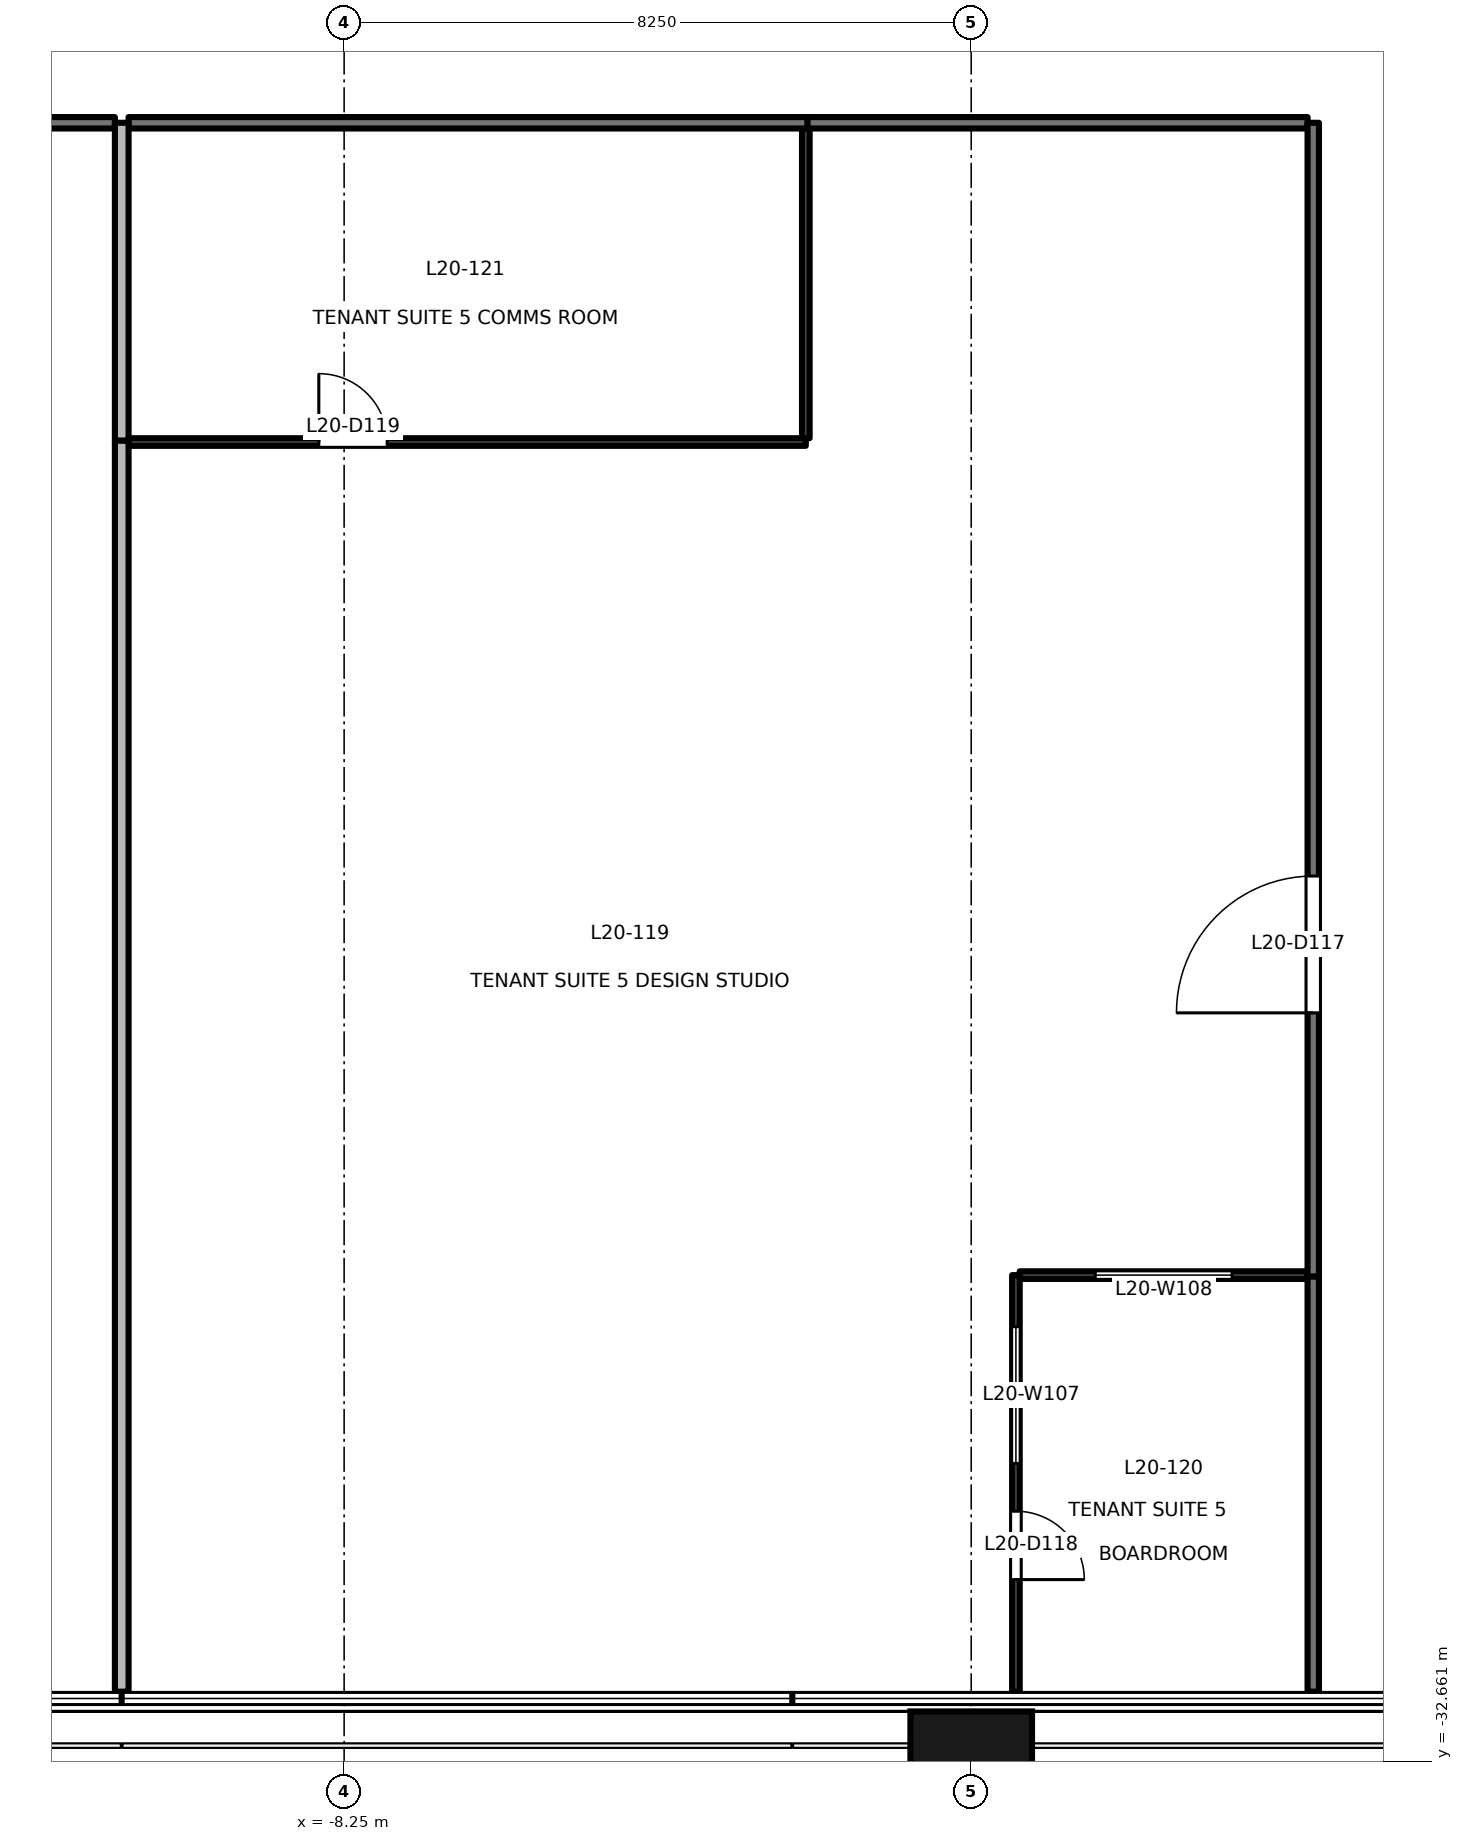
"""IFC4 building model, lengths in metres.
Left out: names, types, materials, properties, quantities, classifications, styles, units other than length and angle.
Written with IfcOpenShell. Run it as: python <this file> out.ifc"""

import sys

from ifc_helpers import new_model, si_unit, direction, frame, frame_2d, origin, origin_2d, place, context, subcontext, project, spatial, rectangle, extrude, element, fill, save


model = new_model("IFC4")
c1 = context("Model", 3, precision=1e-05, world=origin(), true_north=direction((0.0, 1.0)))
c2 = subcontext(c1, "Body", "Model", "MODEL_VIEW")
j1 = project(units=[si_unit("LENGTHUNIT", "METRE"), si_unit("PLANEANGLEUNIT", "RADIAN")], contexts=[c1])
p1 = place(None, origin())
s1 = spatial("IfcSite", under=j1, at=p1, CompositionType="ELEMENT")
p2 = place(p1, origin())
s2 = spatial("IfcBuilding", under=s1, at=p2, CompositionType="ELEMENT")
p3 = place(p2, frame((0.0, 0.0, 91.7)))
s3 = spatial("IfcBuildingStorey", under=s2, at=p3, CompositionType="ELEMENT", Elevation=91.7)
p4 = place(p3, frame((0.0, -32.9, -0.2), z_axis=(0.0, 0.0, 1.0), x_axis=(1.0, 0.0, 0.0)))
e1 = element("IfcColumn", 1, at=p4, inside=s3, PredefinedType="COLUMN", context=c2, shape_type="SweptSolid", body=[
    extrude(rectangle(XDim=1.6, YDim=1.8, at=origin_2d()), origin(), (0.0, 0.0, 1.0), 4.0),
])
p5 = place(p3, frame((-11.266, -11.1, 0.0), z_axis=(0.0, 0.0, 1.0), x_axis=(-1.0, 0.0, 0.0)))
e2 = element("IfcWall", 2, at=p5, inside=s3, PredefinedType="PARTITIONING", context=c2, shape_type="SweptSolid", body=[
    extrude(rectangle(XDim=3.79, YDim=0.15, at=frame_2d((1.895, 0.0))), origin(), (0.0, 0.0, 1.0), 2.8),
])
p6 = place(p5, frame((1.592, 0.0, 0.0)))
e3 = element("IfcOpeningElement", 3, at=p6, cuts=e2, PredefinedType="OPENING", context=c2, shape_type="SweptSolid", body=[
    extrude(rectangle(XDim=1.5, YDim=2.1, at=frame_2d((0.75, 1.05))), frame((0.0, 0.085, 0.0), z_axis=(0.0, -1.0, 0.0), x_axis=(1.0, 0.0, 0.0)), (0.0, 0.0, 1.0), 0.171),
])
p7 = place(p3, frame((4.425, -11.1, 0.0), z_axis=(0.0, 0.0, 1.0), x_axis=(-1.0, 0.0, 0.0)))
e4 = element("IfcWall", 4, at=p7, inside=s3, PredefinedType="PARTITIONING", context=c2, shape_type="SweptSolid", body=[
    extrude(rectangle(XDim=6.581, YDim=0.15, at=frame_2d((3.291, 0.0))), origin(), (0.0, 0.0, 1.0), 2.8),
])
p8 = place(p3, frame((4.5, -26.28, 0.0), z_axis=(0.0, 0.0, 1.0), x_axis=(0.0, 1.0, 0.0)))
e5 = element("IfcWall", 5, at=p8, inside=s3, PredefinedType="PARTITIONING", context=c2, shape_type="SweptSolid", body=[
    extrude(rectangle(XDim=15.18, YDim=0.15, at=frame_2d((7.59, 0.0))), origin(), (0.0, 0.0, 1.0), 2.8),
])
p9 = place(p8, frame((3.47, 0.0, 0.0)))
e6 = element("IfcOpeningElement", 6, at=p9, cuts=e5, PredefinedType="OPENING", context=c2, shape_type="SweptSolid", body=[
    extrude(rectangle(XDim=1.8, YDim=2.1, at=frame_2d((0.9, 1.05))), frame((0.0, 0.085, 0.0), z_axis=(0.0, -1.0, 0.0), x_axis=(1.0, 0.0, 0.0)), (0.0, 0.0, 1.0), 0.171),
])
p10 = place(p3, frame((4.5, -31.74, 0.0), z_axis=(0.0, 0.0, 1.0), x_axis=(0.0, 1.0, 0.0)))
e7 = element("IfcWall", 7, at=p10, inside=s3, PredefinedType="PARTITIONING", context=c2, shape_type="SweptSolid", body=[
    extrude(rectangle(XDim=5.46, YDim=0.15, at=frame_2d((2.73, 0.0))), origin(), (0.0, 0.0, 1.0), 2.8),
])
p11 = place(p3, frame((-2.156, -11.1, 0.0), z_axis=(0.0, 0.0, 1.0), x_axis=(-1.0, 0.0, 0.0)))
e8 = element("IfcWall", 8, at=p11, inside=s3, PredefinedType="PARTITIONING", context=c2, shape_type="SweptSolid", body=[
    extrude(rectangle(XDim=8.93, YDim=0.15, at=frame_2d((4.465, 0.0))), origin(), (0.0, 0.0, 1.0), 2.8),
])
p12 = place(p3, frame((-11.176, -15.28, 0.0), z_axis=(0.0, 0.0, 1.0), x_axis=(0.0, -1.0, 0.0)))
e9 = element("IfcWall", 9, at=p12, inside=s3, PredefinedType="PARTITIONING", context=c2, shape_type="SweptSolid", body=[
    extrude(rectangle(XDim=16.46, YDim=0.18, at=frame_2d((8.23, 0.0))), origin(), (0.0, 0.0, 1.0), 3.8),
])
p13 = place(p3, frame((-11.176, -11.1, 0.0), z_axis=(0.0, 0.0, 1.0), x_axis=(0.0, -1.0, 0.0)))
e10 = element("IfcWall", 10, at=p13, inside=s3, PredefinedType="PARTITIONING", context=c2, shape_type="SweptSolid", body=[
    extrude(rectangle(XDim=4.18, YDim=0.18, at=frame_2d((2.09, 0.0))), origin(), (0.0, 0.0, 1.0), 3.8),
])
p14 = place(p3, frame((0.588, -26.26, 0.0), z_axis=(0.0, 0.0, 1.0), x_axis=(0.0, -1.0, 0.0)))
e11 = element("IfcWall", 11, at=p14, inside=s3, PredefinedType="PARTITIONING", context=c2, shape_type="SweptSolid", body=[
    extrude(rectangle(XDim=5.48, YDim=0.1, at=frame_2d((2.74, 0.0))), origin(), (0.0, 0.0, 1.0), 3.8),
])
p15 = place(p14, frame((3.106, 0.0, 0.0)))
e12 = element("IfcOpeningElement", 12, at=p15, cuts=e11, PredefinedType="OPENING", context=c2, shape_type="SweptSolid", body=[
    extrude(rectangle(XDim=0.9, YDim=2.1, at=frame_2d((0.45, 1.05))), frame((0.0, 0.061, 0.0), z_axis=(0.0, -1.0, 0.0), x_axis=(1.0, 0.0, 0.0)), (0.0, 0.0, 1.0), 0.121),
])
p16 = place(p14, frame((0.678, 0.0, 0.9)))
e13 = element("IfcOpeningElement", 13, at=p16, cuts=e11, PredefinedType="OPENING", context=c2, shape_type="SweptSolid", body=[
    extrude(rectangle(XDim=1.8, YDim=1.2, at=frame_2d((0.9, 0.6))), frame((0.0, 0.061, 0.0), z_axis=(0.0, -1.0, 0.0), x_axis=(1.0, 0.0, 0.0)), (0.0, 0.0, 1.0), 0.121),
])
p17 = place(p3, frame((4.425, -26.26, 0.0), z_axis=(0.0, 0.0, 1.0), x_axis=(-1.0, 0.0, 0.0)))
e14 = element("IfcWall", 14, at=p17, inside=s3, PredefinedType="PARTITIONING", context=c2, shape_type="SweptSolid", body=[
    extrude(rectangle(XDim=3.787, YDim=0.1, at=frame_2d((1.894, 0.0))), origin(), (0.0, 0.0, 1.0), 2.8),
])
p18 = place(p17, frame((0.993, 0.0, 0.9)))
e15 = element("IfcOpeningElement", 15, at=p18, cuts=e14, PredefinedType="OPENING", context=c2, shape_type="SweptSolid", body=[
    extrude(rectangle(XDim=1.8, YDim=1.2, at=frame_2d((0.9, 0.6))), frame((0.0, 0.061, 0.0), z_axis=(0.0, -1.0, 0.0), x_axis=(1.0, 0.0, 0.0)), (0.0, 0.0, 1.0), 0.121),
])
p19 = place(p3, frame((-11.086, -15.3, 0.0), z_axis=(0.0, 0.0, 1.0), x_axis=(1.0, 0.0, 0.0)))
e16 = element("IfcWall", 16, at=p19, inside=s3, PredefinedType="PARTITIONING", context=c2, shape_type="SweptSolid", body=[
    extrude(rectangle(XDim=8.91, YDim=0.1, at=frame_2d((4.455, 0.0))), origin(), (0.0, 0.0, 1.0), 2.8),
])
p20 = place(p19, frame((2.503, 0.0, 0.0)))
e17 = element("IfcOpeningElement", 17, at=p20, cuts=e16, PredefinedType="OPENING", context=c2, shape_type="SweptSolid", body=[
    extrude(rectangle(XDim=0.9, YDim=2.1, at=frame_2d((0.45, 1.05))), frame((0.0, 0.061, 0.0), z_axis=(0.0, -1.0, 0.0), x_axis=(1.0, 0.0, 0.0)), (0.0, 0.0, 1.0), 0.121),
])
p21 = place(p3, frame((-2.176, -15.25, 0.0), z_axis=(0.0, 0.0, 1.0), x_axis=(0.0, 1.0, 0.0)))
e18 = element("IfcWall", 18, at=p21, inside=s3, PredefinedType="PARTITIONING", context=c2, shape_type="SweptSolid", body=[
    extrude(rectangle(XDim=4.075, YDim=0.1, at=frame_2d((2.038, 0.0))), origin(), (0.0, 0.0, 1.0), 3.8),
])
p22 = place(p9, origin())
e19 = element("IfcDoor", 19, at=p22, inside=s3, OperationType="DOUBLE_DOOR_SINGLE_SWING", PredefinedType="DOOR", context=c2, shape_type="SweptSolid", body=[
    extrude(rectangle(XDim=1.8, YDim=2.1, at=frame_2d((0.9, 1.05))), frame((0.0, 0.025, 0.0), z_axis=(0.0, -1.0, 0.0), x_axis=(1.0, 0.0, 0.0)), (0.0, 0.0, 1.0), 0.05),
])
fill(e6, e19)
p23 = place(p15, origin())
e20 = element("IfcDoor", 20, at=p23, inside=s3, OperationType="SINGLE_SWING_RIGHT", PredefinedType="DOOR", context=c2, shape_type="SweptSolid", body=[
    extrude(rectangle(XDim=0.9, YDim=2.1, at=frame_2d((0.45, 1.05))), frame((0.0, 0.025, 0.0), z_axis=(0.0, -1.0, 0.0), x_axis=(1.0, 0.0, 0.0)), (0.0, 0.0, 1.0), 0.05),
])
fill(e12, e20)
p24 = place(p20, origin())
e21 = element("IfcDoor", 21, at=p24, inside=s3, OperationType="SINGLE_SWING_LEFT", PredefinedType="DOOR", context=c2, shape_type="SweptSolid", body=[
    extrude(rectangle(XDim=0.9, YDim=2.1, at=frame_2d((0.45, 1.05))), frame((0.0, 0.025, 0.0), z_axis=(0.0, -1.0, 0.0), x_axis=(1.0, 0.0, 0.0)), (0.0, 0.0, 1.0), 0.05),
])
fill(e17, e21)
p25 = place(p16, origin())
e22 = element("IfcWindow", 22, at=p25, inside=s3, PartitioningType="SINGLE_PANEL", PredefinedType="WINDOW", context=c2, shape_type="SweptSolid", body=[
    extrude(rectangle(XDim=1.8, YDim=1.2, at=frame_2d((0.9, 0.6))), frame((0.0, 0.03, 0.0), z_axis=(0.0, -1.0, 0.0), x_axis=(1.0, 0.0, 0.0)), (0.0, 0.0, 1.0), 0.06),
])
fill(e13, e22)
p26 = place(p18, origin())
e23 = element("IfcWindow", 23, at=p26, inside=s3, PartitioningType="SINGLE_PANEL", PredefinedType="WINDOW", context=c2, shape_type="SweptSolid", body=[
    extrude(rectangle(XDim=1.8, YDim=1.2, at=frame_2d((0.9, 0.6))), frame((0.0, 0.03, 0.0), z_axis=(0.0, -1.0, 0.0), x_axis=(1.0, 0.0, 0.0)), (0.0, 0.0, 1.0), 0.06),
])
fill(e15, e23)
save(model, sys.argv[1])
